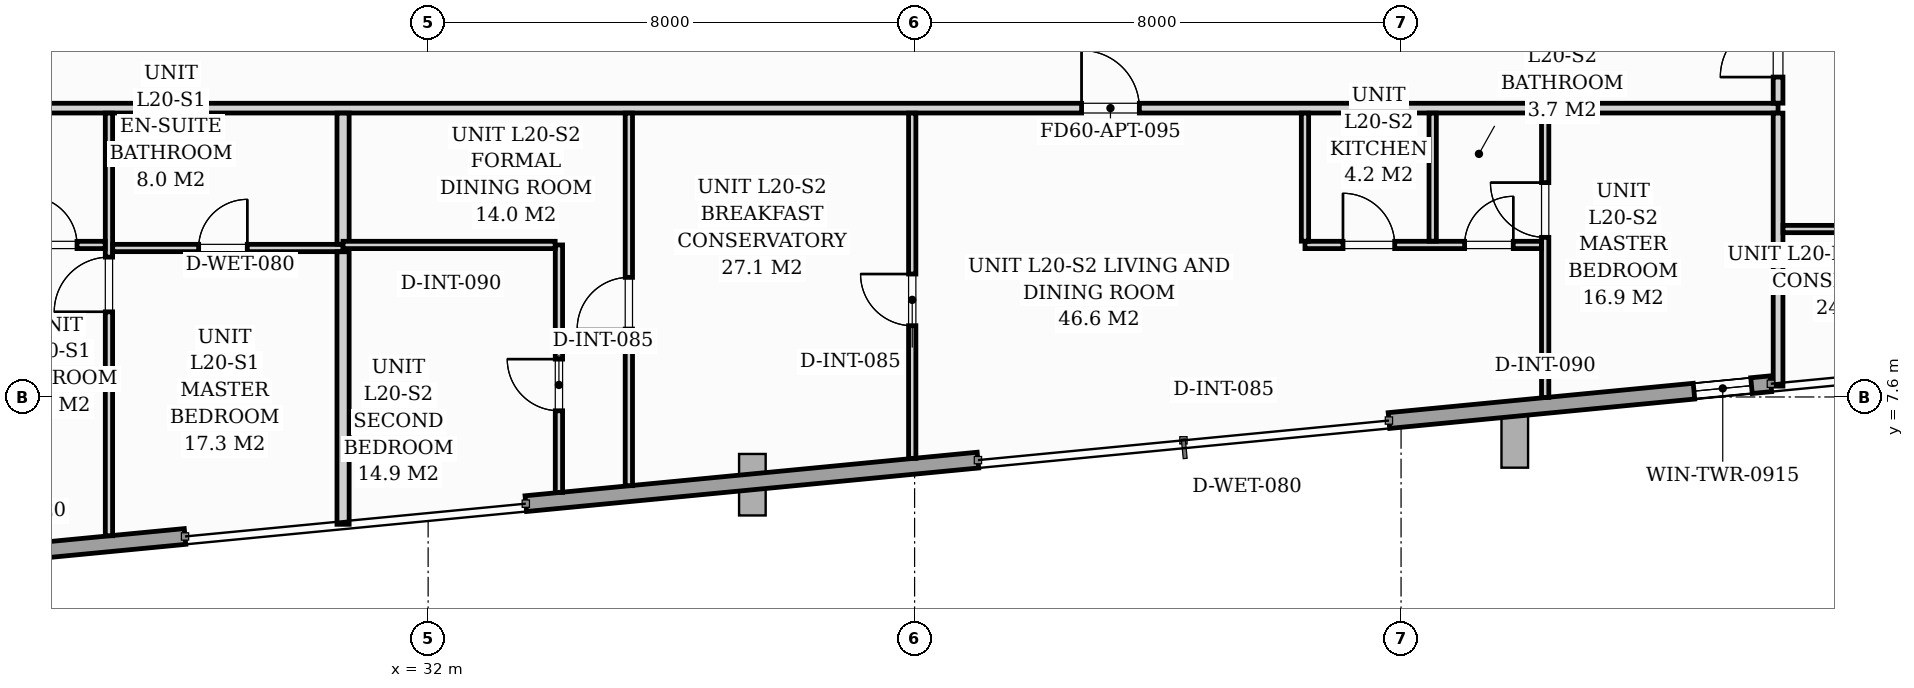
"""IFC4 building model, lengths in metres.
Left out: names, types, materials, properties, quantities, classifications, styles, units other than length and angle.
Written with IfcOpenShell. Run it as: python <this file> out.ifc"""

import sys

from ifc_helpers import new_model, si_unit, direction, frame, frame_2d, origin, origin_2d, place, context, subcontext, project, spatial, rectangle, i_section, extrude, source, transform, mapped, element, fill, save


model = new_model("IFC4")
c1 = context("Model", 3, precision=1e-05, world=origin(), true_north=direction((0.0, 1.0)))
c2 = subcontext(c1, "Body", "Model", "MODEL_VIEW")
j1 = project(units=[si_unit("LENGTHUNIT", "METRE"), si_unit("PLANEANGLEUNIT", "RADIAN")], contexts=[c1])
p1 = place(None, origin())
s1 = spatial("IfcSite", under=j1, at=p1, CompositionType="ELEMENT")
p2 = place(p1, origin())
s2 = spatial("IfcBuilding", under=s1, at=p2, CompositionType="ELEMENT")
p3 = place(p2, frame((0.0, 0.0, 72.6)))
s3 = spatial("IfcBuildingStorey", under=s2, at=p3, CompositionType="ELEMENT", Elevation=72.6)
m1 = source(origin(), c2, "Body", "SweptSolid", [
    extrude(i_section(OverallWidth=0.438, OverallDepth=1.011, WebThickness=0.041, FlangeThickness=0.074, FilletRadius=0.024, at=origin_2d()), origin(), (0.0, 0.0, 1.0), 5.424),
])
p4 = place(p3, frame((24.135, 5.106, 0.133), z_axis=(0.514107031912, 0.207605431326, 0.832222292793), x_axis=(-0.771678997149, -0.311617505897, 0.554442111837)))
e1 = element("IfcColumn", 1, at=p4, inside=s3, PredefinedType="COLUMN", context=c2, shape_type="MappedRepresentation", body=[
    mapped(m1, transform((0.0, 0.0, 0.0), scale=1.0)),
])
m2 = source(origin(), c2, "Body", "SweptSolid", [
    extrude(i_section(OverallWidth=0.438, OverallDepth=1.011, WebThickness=0.041, FlangeThickness=0.074, FilletRadius=0.024, at=origin_2d()), origin(), (0.0, 0.0, 1.0), 5.865),
])
p5 = place(p3, frame((36.539, 5.759, 0.153), z_axis=(0.577983981192, 0.290407189744, 0.762625846421), x_axis=(-0.681444578201, -0.342390812481, 0.646839870733)))
e2 = element("IfcColumn", 2, at=p5, inside=s3, PredefinedType="COLUMN", context=c2, shape_type="MappedRepresentation", body=[
    mapped(m2, transform((0.0, 0.0, 0.0), scale=1.0)),
])
m3 = source(origin(), c2, "Body", "SweptSolid", [
    extrude(i_section(OverallWidth=0.438, OverallDepth=1.011, WebThickness=0.041, FlangeThickness=0.074, FilletRadius=0.024, at=origin_2d()), origin(), (0.0, 0.0, 1.0), 6.388),
])
p6 = place(p3, frame((48.945, 6.415, 0.169), z_axis=(0.624362881187, 0.356074491279, 0.695256750601), x_axis=(-0.60394515579, -0.344430251362, 0.718761469991)))
e3 = element("IfcColumn", 3, at=p6, inside=s3, PredefinedType="COLUMN", context=c2, shape_type="MappedRepresentation", body=[
    mapped(m3, transform((0.0, 0.0, 0.0), scale=1.0)),
])
p7 = place(p3, frame((54.082, 7.817, 0.0), z_axis=(0.0, 0.0, 1.0), x_axis=(-0.995397041205, -0.095836998914, 0.0)))
e4 = element("IfcWall", 4, at=p7, inside=s3, PredefinedType="STANDARD", context=c2, shape_type="SweptSolid", body=[
    extrude(rectangle(XDim=6.31, YDim=0.26, at=frame_2d((3.155, 0.0))), origin(), (0.0, 0.0, 1.0), 4.78),
])
p8 = place(p7, frame((0.32, 0.0, 0.75)))
e5 = element("IfcOpeningElement", 5, at=p8, cuts=e4, PredefinedType="OPENING", context=c2, shape_type="SweptSolid", body=[
    extrude(rectangle(XDim=0.95, YDim=1.5, at=frame_2d((0.475, 0.75))), frame((0.0, 0.14, 0.0), z_axis=(0.0, -1.0, 0.0), x_axis=(1.0, 0.0, 0.0)), (0.0, 0.0, 1.0), 0.28),
])
p9 = place(p3, frame((41.042, 6.562, 0.0), z_axis=(0.0, 0.0, 1.0), x_axis=(-0.995394886335, -0.095859377516, 0.0)))
e6 = element("IfcWall", 6, at=p9, inside=s3, PredefinedType="STANDARD", context=c2, shape_type="SweptSolid", body=[
    extrude(rectangle(XDim=7.47, YDim=0.26, at=frame_2d((3.735, 0.0))), origin(), (0.0, 0.0, 1.0), 4.78),
])
p10 = place(p3, frame((28.002, 5.306, 0.0), z_axis=(0.0, 0.0, 1.0), x_axis=(-0.9953942011, -0.09586649267, 0.0)))
e7 = element("IfcWall", 7, at=p10, inside=s3, PredefinedType="STANDARD", context=c2, shape_type="SweptSolid", body=[
    extrude(rectangle(XDim=7.91, YDim=0.26, at=frame_2d((3.955, 0.0))), origin(), (0.0, 0.0, 1.0), 4.78),
])
p11 = place(p3, frame((16.6, 12.35, 0.0), z_axis=(0.0, 0.0, 1.0), x_axis=(1.0, 0.0, 0.0)))
e8 = element("IfcWall", 8, at=p11, inside=s3, PredefinedType="PARTITIONING", context=c2, shape_type="SweptSolid", body=[
    extrude(rectangle(XDim=37.6, YDim=0.16, at=frame_2d((18.8, 0.0))), origin(), (0.0, 0.0, 1.0), 4.78),
])
p12 = place(p11, frame((2.665, 0.0, 0.0)))
e9 = element("IfcOpeningElement", 9, at=p12, cuts=e8, PredefinedType="OPENING", context=c2, shape_type="SweptSolid", body=[
    extrude(rectangle(XDim=0.95, YDim=2.06, at=frame_2d((0.475, 1.03))), frame((0.0, 0.09, 0.0), z_axis=(0.0, -1.0, 0.0), x_axis=(1.0, 0.0, 0.0)), (0.0, 0.0, 1.0), 0.18),
])
p13 = place(p11, frame((26.146, 0.0, 0.0)))
e10 = element("IfcOpeningElement", 10, at=p13, cuts=e8, PredefinedType="OPENING", context=c2, shape_type="SweptSolid", body=[
    extrude(rectangle(XDim=0.95, YDim=2.06, at=frame_2d((0.475, 1.03))), frame((0.0, 0.09, 0.0), z_axis=(0.0, -1.0, 0.0), x_axis=(1.0, 0.0, 0.0)), (0.0, 0.0, 1.0), 0.18),
])
p14 = place(p3, frame((54.2, 7.778, 0.0), z_axis=(0.0, 0.0, 1.0), x_axis=(0.0, 1.0, 0.0)))
e11 = element("IfcWall", 11, at=p14, inside=s3, PredefinedType="PARTITIONING", context=c2, shape_type="SweptSolid", body=[
    extrude(rectangle(XDim=4.49, YDim=0.16, at=frame_2d((2.245, 0.0))), origin(), (0.0, 0.0, 1.0), 4.78),
])
p15 = place(p3, frame((54.2, 12.432, 0.0), z_axis=(0.0, 0.0, 1.0), x_axis=(0.0, 1.0, 0.0)))
e12 = element("IfcWall", 12, at=p15, inside=s3, PredefinedType="PARTITIONING", context=c2, shape_type="SweptSolid", body=[
    extrude(rectangle(XDim=15.278, YDim=0.16, at=frame_2d((7.639, 0.0))), origin(), (0.0, 0.0, 1.0), 4.78),
])
p16 = place(p15, frame((0.429, 0.0, 0.0)))
e13 = element("IfcOpeningElement", 13, at=p16, cuts=e12, PredefinedType="OPENING", context=c2, shape_type="SweptSolid", body=[
    extrude(rectangle(XDim=0.95, YDim=2.06, at=frame_2d((0.475, 1.03))), frame((0.0, 0.09, 0.0), z_axis=(0.0, -1.0, 0.0), x_axis=(1.0, 0.0, 0.0)), (0.0, 0.0, 1.0), 0.18),
])
p17 = place(p3, frame((26.751, 5.318, 0.0), z_axis=(0.0, 0.0, 1.0), x_axis=(0.0, 1.0, 0.0)))
e14 = element("IfcWall", 14, at=p17, inside=s3, PredefinedType="PARTITIONING", context=c2, shape_type="SweptSolid", body=[
    extrude(rectangle(XDim=6.95, YDim=0.12, at=frame_2d((3.475, 0.0))), origin(), (0.0, 0.0, 1.0), 4.055),
])
p18 = place(p17, frame((3.682, 0.0, 0.0)))
e15 = element("IfcOpeningElement", 15, at=p18, cuts=e14, PredefinedType="OPENING", context=c2, shape_type="SweptSolid", body=[
    extrude(rectangle(XDim=0.9, YDim=2.05, at=frame_2d((0.45, 1.025))), frame((0.0, 0.07, 0.0), z_axis=(0.0, -1.0, 0.0), x_axis=(1.0, 0.0, 0.0)), (0.0, 0.0, 1.0), 0.14),
])
p19 = place(p3, frame((22.801, 10.1, 0.0), z_axis=(0.0, 0.0, 1.0), x_axis=(1.0, 0.0, 0.0)))
e16 = element("IfcWall", 16, at=p19, inside=s3, PredefinedType="PARTITIONING", context=c2, shape_type="SweptSolid", body=[
    extrude(rectangle(XDim=3.888, YDim=0.12, at=frame_2d((1.944, 0.0))), origin(), (0.0, 0.0, 1.0), 4.78),
])
p20 = place(p19, frame((0.625, 0.0, 0.0)))
e17 = element("IfcOpeningElement", 17, at=p20, cuts=e16, PredefinedType="OPENING", context=c2, shape_type="SweptSolid", body=[
    extrude(rectangle(XDim=0.85, YDim=2.05, at=frame_2d((0.425, 1.025))), frame((0.0, 0.07, 0.0), z_axis=(0.0, -1.0, 0.0), x_axis=(1.0, 0.0, 0.0)), (0.0, 0.0, 1.0), 0.14),
])
p21 = place(p19, frame((2.625, 0.0, 0.0)))
e18 = element("IfcOpeningElement", 18, at=p21, cuts=e16, PredefinedType="OPENING", context=c2, shape_type="SweptSolid", body=[
    extrude(rectangle(XDim=0.8, YDim=2.02, at=frame_2d((0.4, 1.01))), frame((0.0, 0.07, 0.0), z_axis=(0.0, -1.0, 0.0), x_axis=(1.0, 0.0, 0.0)), (0.0, 0.0, 1.0), 0.14),
])
p22 = place(p3, frame((26.813, 10.05, 0.0), z_axis=(0.0, 0.0, 1.0), x_axis=(1.0, 0.0, 0.0)))
e19 = element("IfcWall", 19, at=p22, inside=s3, PredefinedType="PARTITIONING", context=c2, shape_type="SweptSolid", body=[
    extrude(rectangle(XDim=3.788, YDim=0.12, at=frame_2d((1.894, 0.0))), origin(), (0.0, 0.0, 1.0), 4.78),
])
p23 = place(p22, frame((1.413, 0.0, 0.0)))
e20 = element("IfcOpeningElement", 20, at=p23, cuts=e19, PredefinedType="OPENING", context=c2, shape_type="SweptSolid", body=[
    extrude(rectangle(XDim=0.8, YDim=2.02, at=frame_2d((0.4, 1.01))), frame((0.0, 0.07, 0.0), z_axis=(0.0, -1.0, 0.0), x_axis=(1.0, 0.0, 0.0)), (0.0, 0.0, 1.0), 0.14),
])
p24 = place(p3, frame((30.601, 5.506, 0.0), z_axis=(0.0, 0.0, 1.0), x_axis=(0.0, 1.0, 0.0)))
e21 = element("IfcWall", 21, at=p24, inside=s3, PredefinedType="PARTITIONING", context=c2, shape_type="SweptSolid", body=[
    extrude(rectangle(XDim=4.482, YDim=0.2, at=frame_2d((2.241, 0.0))), origin(), (0.0, 0.0, 1.0), 4.78),
])
p25 = place(p3, frame((30.601, 10.112, 0.0), z_axis=(0.0, 0.0, 1.0), x_axis=(0.0, 1.0, 0.0)))
e22 = element("IfcWall", 22, at=p25, inside=s3, PredefinedType="PARTITIONING", context=c2, shape_type="SweptSolid", body=[
    extrude(rectangle(XDim=2.156, YDim=0.2, at=frame_2d((1.078, 0.0))), origin(), (0.0, 0.0, 1.0), 4.78),
])
p26 = place(p3, frame((50.37, 7.593, 0.0), z_axis=(0.0, 0.0, 1.0), x_axis=(0.0, 1.0, 0.0)))
e23 = element("IfcWall", 23, at=p26, inside=s3, PredefinedType="PARTITIONING", context=c2, shape_type="SweptSolid", body=[
    extrude(rectangle(XDim=4.676, YDim=0.12, at=frame_2d((2.338, 0.0))), origin(), (0.0, 0.0, 1.0), 4.78),
])
p27 = place(p26, frame((2.633, 0.0, 0.0)))
e24 = element("IfcOpeningElement", 24, at=p27, cuts=e23, PredefinedType="OPENING", context=c2, shape_type="SweptSolid", body=[
    extrude(rectangle(XDim=0.9, YDim=2.05, at=frame_2d((0.45, 1.025))), frame((0.0, 0.07, 0.0), z_axis=(0.0, -1.0, 0.0), x_axis=(1.0, 0.0, 0.0)), (0.0, 0.0, 1.0), 0.14),
])
p28 = place(p3, frame((46.42, 10.1, 0.0), z_axis=(0.0, 0.0, 1.0), x_axis=(1.0, 0.0, 0.0)))
e25 = element("IfcWall", 25, at=p28, inside=s3, PredefinedType="PARTITIONING", context=c2, shape_type="SweptSolid", body=[
    extrude(rectangle(XDim=3.888, YDim=0.12, at=frame_2d((1.944, 0.0))), origin(), (0.0, 0.0, 1.0), 4.78),
])
p29 = place(p28, frame((0.625, 0.0, 0.0)))
e26 = element("IfcOpeningElement", 26, at=p29, cuts=e25, PredefinedType="OPENING", context=c2, shape_type="SweptSolid", body=[
    extrude(rectangle(XDim=0.85, YDim=2.05, at=frame_2d((0.425, 1.025))), frame((0.0, 0.07, 0.0), z_axis=(0.0, -1.0, 0.0), x_axis=(1.0, 0.0, 0.0)), (0.0, 0.0, 1.0), 0.14),
])
p30 = place(p28, frame((2.625, 0.0, 0.0)))
e27 = element("IfcOpeningElement", 27, at=p30, cuts=e25, PredefinedType="OPENING", context=c2, shape_type="SweptSolid", body=[
    extrude(rectangle(XDim=0.8, YDim=2.02, at=frame_2d((0.4, 1.01))), frame((0.0, 0.07, 0.0), z_axis=(0.0, -1.0, 0.0), x_axis=(1.0, 0.0, 0.0)), (0.0, 0.0, 1.0), 0.14),
])
for number, where, z_axis, x_axis in (
    (28, (48.52, 10.162, 0.0), (0.0, 0.0, 1.0), (0.0, 1.0, 0.0)),
    (29, (46.42, 10.162, 0.0), (0.0, 0.0, 1.0), (0.0, 1.0, 0.0)),
):
    element("IfcWall", number, at=place(p3, frame(where, z_axis=z_axis, x_axis=x_axis)), inside=s3, PredefinedType="PARTITIONING", context=c2, shape_type="SweptSolid", body=[
        extrude(rectangle(XDim=2.106, YDim=0.12, at=frame_2d((1.053, 0.0))), origin(), (0.0, 0.0, 1.0), 4.78),
    ])
p31 = place(p3, frame((34.151, 6.031, 0.0), z_axis=(0.0, 0.0, 1.0), x_axis=(0.0, 1.0, 0.0)))
e30 = element("IfcWall", 30, at=p31, inside=s3, PredefinedType="PARTITIONING", context=c2, shape_type="SweptSolid", body=[
    extrude(rectangle(XDim=4.069, YDim=0.12, at=frame_2d((2.035, 0.0))), origin(), (0.0, 0.0, 1.0), 4.78),
])
p32 = place(p31, frame((1.342, 0.0, 0.0)))
e31 = element("IfcOpeningElement", 31, at=p32, cuts=e30, PredefinedType="OPENING", context=c2, shape_type="SweptSolid", body=[
    extrude(rectangle(XDim=0.85, YDim=2.05, at=frame_2d((0.425, 1.025))), frame((0.0, 0.07, 0.0), z_axis=(0.0, -1.0, 0.0), x_axis=(1.0, 0.0, 0.0)), (0.0, 0.0, 1.0), 0.14),
])
p33 = place(p3, frame((30.601, 10.1, 0.0), z_axis=(0.0, 0.0, 1.0), x_axis=(1.0, 0.0, 0.0)))
e32 = element("IfcWall", 32, at=p33, inside=s3, PredefinedType="PARTITIONING", context=c2, shape_type="SweptSolid", body=[
    extrude(rectangle(XDim=3.488, YDim=0.12, at=frame_2d((1.744, 0.0))), origin(), (0.0, 0.0, 1.0), 4.78),
])
p34 = place(p3, frame((35.301, 6.142, 0.0), z_axis=(0.0, 0.0, 1.0), x_axis=(0.0, 1.0, 0.0)))
e33 = element("IfcWall", 33, at=p34, inside=s3, PredefinedType="PARTITIONING", context=c2, shape_type="SweptSolid", body=[
    extrude(rectangle(XDim=6.126, YDim=0.12, at=frame_2d((3.063, 0.0))), origin(), (0.0, 0.0, 1.0), 4.78),
])
p35 = place(p34, frame((2.575, 0.0, 0.0)))
e34 = element("IfcOpeningElement", 34, at=p35, cuts=e33, PredefinedType="OPENING", context=c2, shape_type="SweptSolid", body=[
    extrude(rectangle(XDim=0.85, YDim=2.05, at=frame_2d((0.425, 1.025))), frame((0.0, 0.07, 0.0), z_axis=(0.0, -1.0, 0.0), x_axis=(1.0, 0.0, 0.0)), (0.0, 0.0, 1.0), 0.14),
])
p36 = place(p3, frame((39.961, 6.59, 0.0), z_axis=(0.0, 0.0, 1.0), x_axis=(0.0, 1.0, 0.0)))
e35 = element("IfcWall", 35, at=p36, inside=s3, PredefinedType="PARTITIONING", context=c2, shape_type="SweptSolid", body=[
    extrude(rectangle(XDim=5.678, YDim=0.12, at=frame_2d((2.839, 0.0))), origin(), (0.0, 0.0, 1.0), 4.78),
])
p37 = place(p36, frame((2.182, 0.0, 0.0)))
e36 = element("IfcOpeningElement", 36, at=p37, cuts=e35, PredefinedType="OPENING", context=c2, shape_type="SweptSolid", body=[
    extrude(rectangle(XDim=0.85, YDim=2.05, at=frame_2d((0.425, 1.025))), frame((0.0, 0.07, 0.0), z_axis=(0.0, -1.0, 0.0), x_axis=(1.0, 0.0, 0.0)), (0.0, 0.0, 1.0), 0.14),
])
p38 = place(p3, frame((54.282, 10.362, 0.0), z_axis=(0.0, 0.0, 1.0), x_axis=(1.0, 0.0, 0.0)))
e37 = element("IfcWall", 37, at=p38, inside=s3, PredefinedType="PARTITIONING", context=c2, shape_type="SweptSolid", body=[
    extrude(rectangle(XDim=12.655, YDim=0.12, at=frame_2d((6.327, 0.0))), origin(), (0.0, 0.0, 1.0), 4.78),
])
p39 = place(p38, frame((4.853, 0.0, 0.0)))
e38 = element("IfcOpeningElement", 38, at=p39, cuts=e37, PredefinedType="OPENING", context=c2, shape_type="SweptSolid", body=[
    extrude(rectangle(XDim=0.85, YDim=2.05, at=frame_2d((0.425, 1.025))), frame((0.0, 0.07, 0.0), z_axis=(0.0, -1.0, 0.0), x_axis=(1.0, 0.0, 0.0)), (0.0, 0.0, 1.0), 0.14),
])
m4 = source(origin(), c2, "Body", "SweptSolid", [
    extrude(rectangle(XDim=0.95, YDim=1.5, at=frame_2d((0.475, 0.75))), frame((0.0, 0.03, 0.0), z_axis=(0.0, -1.0, 0.0), x_axis=(1.0, 0.0, 0.0)), (0.0, 0.0, 1.0), 0.06),
])
p40 = place(p8, origin())
e39 = element("IfcWindow", 39, at=p40, inside=s3, PartitioningType="SINGLE_PANEL", PredefinedType="WINDOW", context=c2, shape_type="MappedRepresentation", body=[
    mapped(m4, transform((0.0, 0.0, 0.0), scale=1.0)),
])
fill(e5, e39)
m5 = source(origin(), c2, "Body", "SweptSolid", [
    extrude(rectangle(XDim=0.8, YDim=2.02, at=frame_2d((0.4, 1.01))), frame((0.0, 0.025, 0.0), z_axis=(0.0, -1.0, 0.0), x_axis=(1.0, 0.0, 0.0)), (0.0, 0.0, 1.0), 0.05),
])
p41 = place(p23, origin())
e40 = element("IfcDoor", 40, at=p41, inside=s3, OperationType="SINGLE_SWING_RIGHT", PredefinedType="DOOR", context=c2, shape_type="MappedRepresentation", body=[
    mapped(m5, transform((0.0, 0.0, 0.0), scale=1.0)),
])
fill(e20, e40)
m6 = source(origin(), c2, "Body", "SweptSolid", [
    extrude(rectangle(XDim=0.9, YDim=2.05, at=frame_2d((0.45, 1.025))), frame((0.0, 0.025, 0.0), z_axis=(0.0, -1.0, 0.0), x_axis=(1.0, 0.0, 0.0)), (0.0, 0.0, 1.0), 0.05),
])
p42 = place(p18, origin())
e41 = element("IfcDoor", 41, at=p42, inside=s3, OperationType="SINGLE_SWING_LEFT", PredefinedType="DOOR", context=c2, shape_type="MappedRepresentation", body=[
    mapped(m6, transform((0.0, 0.0, 0.0), scale=1.0)),
])
fill(e15, e41)
p43 = place(p21, origin())
e42 = element("IfcDoor", 42, at=p43, inside=s3, OperationType="SINGLE_SWING_LEFT", PredefinedType="DOOR", context=c2, shape_type="MappedRepresentation", body=[
    mapped(m5, transform((0.0, 0.0, 0.0), scale=1.0)),
])
fill(e18, e42)
m7 = source(origin(), c2, "Body", "SweptSolid", [
    extrude(rectangle(XDim=0.85, YDim=2.05, at=frame_2d((0.425, 1.025))), frame((0.0, 0.025, 0.0), z_axis=(0.0, -1.0, 0.0), x_axis=(1.0, 0.0, 0.0)), (0.0, 0.0, 1.0), 0.05),
])
p44 = place(p32, origin())
e43 = element("IfcDoor", 43, at=p44, inside=s3, OperationType="SINGLE_SWING_RIGHT", PredefinedType="DOOR", context=c2, shape_type="MappedRepresentation", body=[
    mapped(m7, transform((0.0, 0.0, 0.0), scale=1.0)),
])
fill(e31, e43)
p45 = place(p35, origin())
e44 = element("IfcDoor", 44, at=p45, inside=s3, OperationType="SINGLE_SWING_LEFT", PredefinedType="DOOR", context=c2, shape_type="MappedRepresentation", body=[
    mapped(m7, transform((0.0, 0.0, 0.0), scale=1.0)),
])
fill(e34, e44)
p46 = place(p37, origin())
e45 = element("IfcDoor", 45, at=p46, inside=s3, OperationType="SINGLE_SWING_RIGHT", PredefinedType="DOOR", context=c2, shape_type="MappedRepresentation", body=[
    mapped(m7, transform((0.0, 0.0, 0.0), scale=1.0)),
])
fill(e36, e45)
m8 = source(origin(), c2, "Body", "SweptSolid", [
    extrude(rectangle(XDim=0.95, YDim=2.06, at=frame_2d((0.475, 1.03))), frame((0.0, 0.025, 0.0), z_axis=(0.0, -1.0, 0.0), x_axis=(1.0, 0.0, 0.0)), (0.0, 0.0, 1.0), 0.05),
])
p47 = place(p13, origin())
e46 = element("IfcDoor", 46, at=p47, inside=s3, OperationType="SINGLE_SWING_LEFT", PredefinedType="DOOR", context=c2, shape_type="MappedRepresentation", body=[
    mapped(m8, transform((0.0, 0.0, 0.0), scale=1.0)),
])
fill(e10, e46)
p48 = place(p27, origin())
e47 = element("IfcDoor", 47, at=p48, inside=s3, OperationType="SINGLE_SWING_RIGHT", PredefinedType="DOOR", context=c2, shape_type="MappedRepresentation", body=[
    mapped(m6, transform((0.0, 0.0, 0.0), scale=1.0)),
])
fill(e24, e47)
p49 = place(p29, origin())
e48 = element("IfcDoor", 48, at=p49, inside=s3, OperationType="SINGLE_SWING_LEFT", PredefinedType="DOOR", context=c2, shape_type="MappedRepresentation", body=[
    mapped(m7, transform((0.0, 0.0, 0.0), scale=1.0)),
])
fill(e26, e48)
p50 = place(p30, origin())
e49 = element("IfcDoor", 49, at=p50, inside=s3, OperationType="SINGLE_SWING_RIGHT", PredefinedType="DOOR", context=c2, shape_type="MappedRepresentation", body=[
    mapped(m5, transform((0.0, 0.0, 0.0), scale=1.0)),
])
fill(e27, e49)
p51 = place(p16, origin())
e50 = element("IfcDoor", 50, at=p51, inside=s3, OperationType="SINGLE_SWING_LEFT", PredefinedType="DOOR", context=c2, shape_type="MappedRepresentation", body=[
    mapped(m8, transform((0.0, 0.0, 0.0), scale=1.0)),
])
fill(e13, e50)
save(model, sys.argv[1])
